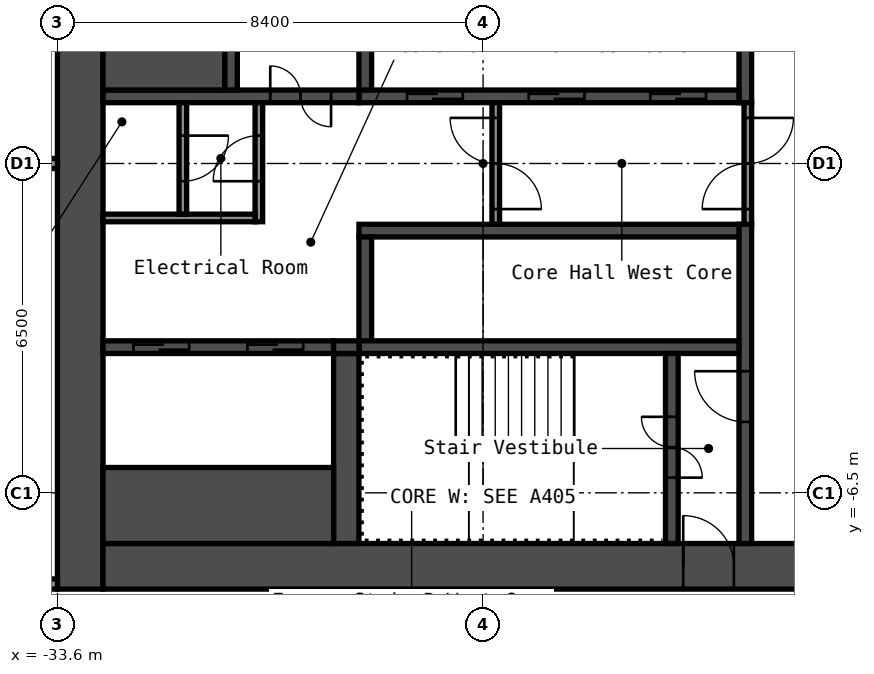
"""IFC4 building model, lengths in metres.
Left out: names, types, materials, properties, quantities, classifications, styles, units other than length and angle.
Written with IfcOpenShell. Run it as: python <this file> out.ifc"""

import sys

from ifc_helpers import new_model, si_unit, direction, frame, frame_2d, origin, place, context, subcontext, project, spatial, rectangle, extrude, element, fill, save


model = new_model("IFC4")
c1 = context("Model", 3, precision=1e-05, world=origin(), true_north=direction((0.0, 1.0)))
c2 = subcontext(c1, "Body", "Model", "MODEL_VIEW")
j1 = project(units=[si_unit("LENGTHUNIT", "METRE"), si_unit("PLANEANGLEUNIT", "RADIAN")], contexts=[c1])
p1 = place(None, origin())
s1 = spatial("IfcSite", under=j1, at=p1, CompositionType="ELEMENT")
p2 = place(p1, origin())
s2 = spatial("IfcBuilding", under=s1, at=p2, CompositionType="ELEMENT")
p3 = place(p2, frame((0.0, 0.0, 35.8)))
s3 = spatial("IfcBuildingStorey", under=s2, at=p3, CompositionType="ELEMENT", Elevation=35.8)
p4 = place(p3, frame((-33.15, -8.4, 0.0), z_axis=(0.0, 0.0, 1.0), x_axis=(0.0, 1.0, 0.0)))
e1 = element("IfcWall", 1, at=p4, inside=s3, PredefinedType="SHEAR", context=c2, shape_type="SweptSolid", body=[
    extrude(rectangle(XDim=16.8, YDim=0.9, at=frame_2d((8.4, 0.0))), origin(), (0.0, 0.0, 1.0), 2.8),
])
p5 = place(p3, frame((-32.7, -7.95, 0.0), z_axis=(0.0, 0.0, 1.0), x_axis=(1.0, 0.0, 0.0)))
e2 = element("IfcWall", 2, at=p5, inside=s3, PredefinedType="SHEAR", context=c2, shape_type="SweptSolid", body=[
    extrude(rectangle(XDim=15.0, YDim=0.9, at=frame_2d((7.5, 0.0))), origin(), (0.0, 0.0, 1.0), 2.8),
])
p6 = place(p5, frame((11.45, 0.0, 0.0)))
e3 = element("IfcOpeningElement", 3, at=p6, cuts=e2, PredefinedType="OPENING", context=c2, shape_type="SweptSolid", body=[
    extrude(rectangle(XDim=1.0, YDim=2.1, at=frame_2d((0.5, 1.05))), frame((0.0, 0.46, 0.0), z_axis=(0.0, -1.0, 0.0), x_axis=(1.0, 0.0, 0.0)), (0.0, 0.0, 1.0), 0.92),
])
p7 = place(p3, frame((-20.025, 1.2, 0.0), z_axis=(0.0, 0.0, 1.0), x_axis=(0.0, 1.0, 0.0)))
e4 = element("IfcWall", 4, at=p7, inside=s3, PredefinedType="SHEAR", context=c2, shape_type="SweptSolid", body=[
    extrude(rectangle(XDim=6.3, YDim=0.25, at=frame_2d((3.15, 0.0))), origin(), (0.0, 0.0, 1.0), 2.8),
])
p8 = place(p3, frame((-20.025, -7.5, 0.0), z_axis=(0.0, 0.0, 1.0), x_axis=(0.0, 1.0, 0.0)))
e5 = element("IfcWall", 5, at=p8, inside=s3, PredefinedType="SHEAR", context=c2, shape_type="SweptSolid", body=[
    extrude(rectangle(XDim=6.3, YDim=0.25, at=frame_2d((3.15, 0.0))), origin(), (0.0, 0.0, 1.0), 2.8),
])
p9 = place(p8, frame((2.4, 0.0, 0.0)))
e6 = element("IfcOpeningElement", 6, at=p9, cuts=e5, PredefinedType="OPENING", context=c2, shape_type="SweptSolid", body=[
    extrude(rectangle(XDim=1.0, YDim=2.1, at=frame_2d((0.5, 1.05))), frame((0.0, 0.135, 0.0), z_axis=(0.0, -1.0, 0.0), x_axis=(1.0, 0.0, 0.0)), (0.0, 0.0, 1.0), 0.27),
])
p10 = place(p3, frame((-27.65, 1.325, 0.0), z_axis=(0.0, 0.0, 1.0), x_axis=(1.0, 0.0, 0.0)))
e7 = element("IfcWall", 7, at=p10, inside=s3, PredefinedType="SHEAR", context=c2, shape_type="SweptSolid", body=[
    extrude(rectangle(XDim=7.5, YDim=0.25, at=frame_2d((3.75, 0.0))), origin(), (0.0, 0.0, 1.0), 2.8),
])
p11 = place(p10, frame((5.75, 0.0, 0.0)))
e8 = element("IfcOpeningElement", 8, at=p11, cuts=e7, PredefinedType="OPENING", context=c2, shape_type="SweptSolid", body=[
    extrude(rectangle(XDim=1.1, YDim=2.1, at=frame_2d((0.55, 1.05))), frame((0.0, 0.135, 0.0), z_axis=(0.0, -1.0, 0.0), x_axis=(1.0, 0.0, 0.0)), (0.0, 0.0, 1.0), 0.27),
])
p12 = place(p10, frame((3.35, 0.0, 0.0)))
e9 = element("IfcOpeningElement", 9, at=p12, cuts=e7, PredefinedType="OPENING", context=c2, shape_type="SweptSolid", body=[
    extrude(rectangle(XDim=1.1, YDim=2.1, at=frame_2d((0.55, 1.05))), frame((0.0, 0.135, 0.0), z_axis=(0.0, -1.0, 0.0), x_axis=(1.0, 0.0, 0.0)), (0.0, 0.0, 1.0), 0.27),
])
p13 = place(p10, frame((0.95, 0.0, 0.0)))
e10 = element("IfcOpeningElement", 10, at=p13, cuts=e7, PredefinedType="OPENING", context=c2, shape_type="SweptSolid", body=[
    extrude(rectangle(XDim=1.1, YDim=2.1, at=frame_2d((0.55, 1.05))), frame((0.0, 0.135, 0.0), z_axis=(0.0, -1.0, 0.0), x_axis=(1.0, 0.0, 0.0)), (0.0, 0.0, 1.0), 0.27),
])
p14 = place(p3, frame((-27.525, 1.45, 0.0), z_axis=(0.0, 0.0, 1.0), x_axis=(0.0, 1.0, 0.0)))
e11 = element("IfcWall", 11, at=p14, inside=s3, PredefinedType="SHEAR", context=c2, shape_type="SweptSolid", body=[
    extrude(rectangle(XDim=2.05, YDim=0.25, at=frame_2d((1.025, 0.0))), origin(), (0.0, 0.0, 1.0), 2.8),
])
p15 = place(p3, frame((-32.7, 1.325, 0.0), z_axis=(0.0, 0.0, 1.0), x_axis=(1.0, 0.0, 0.0)))
e12 = element("IfcWall", 12, at=p15, inside=s3, PredefinedType="SHEAR", context=c2, shape_type="SweptSolid", body=[
    extrude(rectangle(XDim=5.05, YDim=0.25, at=frame_2d((2.525, 0.0))), origin(), (0.0, 0.0, 1.0), 2.8),
])
p16 = place(p15, frame((3.3, 0.0, 0.0)))
e13 = element("IfcOpeningElement", 13, at=p16, cuts=e12, PredefinedType="OPENING", context=c2, shape_type="SweptSolid", body=[
    extrude(rectangle(XDim=1.2, YDim=2.1, at=frame_2d((0.6, 1.05))), frame((0.0, 0.135, 0.0), z_axis=(0.0, -1.0, 0.0), x_axis=(1.0, 0.0, 0.0)), (0.0, 0.0, 1.0), 0.27),
])
p17 = place(p3, frame((-30.175, 1.45, 0.0), z_axis=(0.0, 0.0, 1.0), x_axis=(0.0, 1.0, 0.0)))
e14 = element("IfcWall", 14, at=p17, inside=s3, PredefinedType="SHEAR", context=c2, shape_type="SweptSolid", body=[
    extrude(rectangle(XDim=6.05, YDim=0.25, at=frame_2d((3.025, 0.0))), origin(), (0.0, 0.0, 1.0), 2.8),
])
p18 = place(p17, frame((2.625, 0.0, 0.0)))
e15 = element("IfcOpeningElement", 15, at=p18, cuts=e14, PredefinedType="OPENING", context=c2, shape_type="SweptSolid", body=[
    extrude(rectangle(XDim=1.1, YDim=2.1, at=frame_2d((0.55, 1.05))), frame((0.0, 0.135, 0.0), z_axis=(0.0, -1.0, 0.0), x_axis=(1.0, 0.0, 0.0)), (0.0, 0.0, 1.0), 0.27),
])
p19 = place(p3, frame((-32.7, 2.375, 0.0), z_axis=(0.0, 0.0, 1.0), x_axis=(1.0, 0.0, 0.0)))
e16 = element("IfcWall", 16, at=p19, inside=s3, PredefinedType="SHEAR", context=c2, shape_type="SweptSolid", body=[
    extrude(rectangle(XDim=2.4, YDim=1.85, at=frame_2d((1.2, 0.0))), origin(), (0.0, 0.0, 1.0), 2.8),
])
p20 = place(p3, frame((-27.65, -1.325, 0.0), z_axis=(0.0, 0.0, 1.0), x_axis=(1.0, 0.0, 0.0)))
e17 = element("IfcWall", 17, at=p20, inside=s3, PredefinedType="SHEAR", context=c2, shape_type="SweptSolid", body=[
    extrude(rectangle(XDim=7.5, YDim=0.25, at=frame_2d((3.75, 0.0))), origin(), (0.0, 0.0, 1.0), 2.8),
])
p21 = place(p3, frame((-27.525, -3.5, 0.0), z_axis=(0.0, 0.0, 1.0), x_axis=(0.0, 1.0, 0.0)))
e18 = element("IfcWall", 18, at=p21, inside=s3, PredefinedType="SHEAR", context=c2, shape_type="SweptSolid", body=[
    extrude(rectangle(XDim=2.05, YDim=0.25, at=frame_2d((1.025, 0.0))), origin(), (0.0, 0.0, 1.0), 2.8),
])
p22 = place(p3, frame((-27.65, -3.625, 0.0), z_axis=(0.0, 0.0, 1.0), x_axis=(1.0, 0.0, 0.0)))
e19 = element("IfcWall", 19, at=p22, inside=s3, PredefinedType="SHEAR", context=c2, shape_type="SweptSolid", body=[
    extrude(rectangle(XDim=7.5, YDim=0.25, at=frame_2d((3.75, 0.0))), origin(), (0.0, 0.0, 1.0), 2.8),
])
p23 = place(p3, frame((-21.475, -7.5, 0.0), z_axis=(0.0, 0.0, 1.0), x_axis=(0.0, 1.0, 0.0)))
e20 = element("IfcWall", 20, at=p23, inside=s3, PredefinedType="SHEAR", context=c2, shape_type="SweptSolid", body=[
    extrude(rectangle(XDim=3.75, YDim=0.25, at=frame_2d((1.875, 0.0))), origin(), (0.0, 0.0, 1.0), 2.8),
])
p24 = place(p23, frame((1.3, 0.0, 0.0)))
e21 = element("IfcOpeningElement", 21, at=p24, cuts=e20, PredefinedType="OPENING", context=c2, shape_type="SweptSolid", body=[
    extrude(rectangle(XDim=1.2, YDim=2.1, at=frame_2d((0.6, 1.05))), frame((0.0, 0.135, 0.0), z_axis=(0.0, -1.0, 0.0), x_axis=(1.0, 0.0, 0.0)), (0.0, 0.0, 1.0), 0.27),
])
p25 = place(p3, frame((-27.9, -7.5, 0.0), z_axis=(0.0, 0.0, 1.0), x_axis=(0.0, 1.0, 0.0)))
e22 = element("IfcWall", 22, at=p25, inside=s3, PredefinedType="SHEAR", context=c2, shape_type="SweptSolid", body=[
    extrude(rectangle(XDim=3.75, YDim=0.5, at=frame_2d((1.875, 0.0))), origin(), (0.0, 0.0, 1.0), 2.8),
])
p26 = place(p3, frame((-32.7, -3.625, 0.0), z_axis=(0.0, 0.0, 1.0), x_axis=(1.0, 0.0, 0.0)))
e23 = element("IfcWall", 23, at=p26, inside=s3, PredefinedType="SHEAR", context=c2, shape_type="SweptSolid", body=[
    extrude(rectangle(XDim=4.55, YDim=0.25, at=frame_2d((2.275, 0.0))), origin(), (0.0, 0.0, 1.0), 2.8),
])
p27 = place(p26, frame((2.85, 0.0, 0.0)))
e24 = element("IfcOpeningElement", 24, at=p27, cuts=e23, PredefinedType="OPENING", context=c2, shape_type="SweptSolid", body=[
    extrude(rectangle(XDim=1.1, YDim=2.1, at=frame_2d((0.55, 1.05))), frame((0.0, 0.135, 0.0), z_axis=(0.0, -1.0, 0.0), x_axis=(1.0, 0.0, 0.0)), (0.0, 0.0, 1.0), 0.27),
])
p28 = place(p26, frame((0.6, 0.0, 0.0)))
e25 = element("IfcOpeningElement", 25, at=p28, cuts=e23, PredefinedType="OPENING", context=c2, shape_type="SweptSolid", body=[
    extrude(rectangle(XDim=1.1, YDim=2.1, at=frame_2d((0.55, 1.05))), frame((0.0, 0.135, 0.0), z_axis=(0.0, -1.0, 0.0), x_axis=(1.0, 0.0, 0.0)), (0.0, 0.0, 1.0), 0.27),
])
p29 = place(p3, frame((-32.7, -6.75, 0.0), z_axis=(0.0, 0.0, 1.0), x_axis=(1.0, 0.0, 0.0)))
e26 = element("IfcWall", 26, at=p29, inside=s3, PredefinedType="SHEAR", context=c2, shape_type="SweptSolid", body=[
    extrude(rectangle(XDim=4.55, YDim=1.5, at=frame_2d((2.275, 0.0))), origin(), (0.0, 0.0, 1.0), 2.8),
])
p30 = place(p3, frame((-28.15, -3.625, 0.0), z_axis=(0.0, 0.0, 1.0), x_axis=(1.0, 0.0, 0.0)))
e27 = element("IfcWall", 27, at=p30, inside=s3, PredefinedType="SHEAR", context=c2, shape_type="SweptSolid", body=[
    extrude(rectangle(XDim=0.5, YDim=0.25, at=frame_2d((0.25, 0.0))), origin(), (0.0, 0.0, 1.0), 2.8),
])
p31 = place(p3, frame((-19.975, -1.2, 0.0), z_axis=(0.0, 0.0, 1.0), x_axis=(0.0, 1.0, 0.0)))
e28 = element("IfcWall", 28, at=p31, inside=s3, PredefinedType="PARTITIONING", context=c2, shape_type="SweptSolid", body=[
    extrude(rectangle(XDim=2.4, YDim=0.15, at=frame_2d((1.2, 0.0))), origin(), (0.0, 0.0, 1.0), 2.8),
])
p32 = place(p31, frame((0.3, 0.0, 0.0)))
e29 = element("IfcOpeningElement", 29, at=p32, cuts=e28, PredefinedType="OPENING", context=c2, shape_type="SweptSolid", body=[
    extrude(rectangle(XDim=1.8, YDim=2.1, at=frame_2d((0.9, 1.05))), frame((0.0, 0.085, 0.0), z_axis=(0.0, -1.0, 0.0), x_axis=(1.0, 0.0, 0.0)), (0.0, 0.0, 1.0), 0.17),
])
p33 = place(p3, frame((-24.95, -1.2, 0.0), z_axis=(0.0, 0.0, 1.0), x_axis=(0.0, 1.0, 0.0)))
e30 = element("IfcWall", 30, at=p33, inside=s3, PredefinedType="PARTITIONING", context=c2, shape_type="SweptSolid", body=[
    extrude(rectangle(XDim=2.4, YDim=0.15, at=frame_2d((1.2, 0.0))), origin(), (0.0, 0.0, 1.0), 2.8),
])
p34 = place(p33, frame((0.3, 0.0, 0.0)))
e31 = element("IfcOpeningElement", 31, at=p34, cuts=e30, PredefinedType="OPENING", context=c2, shape_type="SweptSolid", body=[
    extrude(rectangle(XDim=1.8, YDim=2.1, at=frame_2d((0.9, 1.05))), frame((0.0, 0.085, 0.0), z_axis=(0.0, -1.0, 0.0), x_axis=(1.0, 0.0, 0.0)), (0.0, 0.0, 1.0), 0.17),
])
p35 = place(p3, frame((-29.625, -1.15, 0.0), z_axis=(0.0, 0.0, 1.0), x_axis=(0.0, 1.0, 0.0)))
e32 = element("IfcWall", 32, at=p35, inside=s3, PredefinedType="PARTITIONING", context=c2, shape_type="SweptSolid", body=[
    extrude(rectangle(XDim=2.35, YDim=0.15, at=frame_2d((1.175, 0.0))), origin(), (0.0, 0.0, 1.0), 2.8),
])
p36 = place(p35, frame((0.8, 0.0, 0.0)))
e33 = element("IfcOpeningElement", 33, at=p36, cuts=e32, PredefinedType="OPENING", context=c2, shape_type="SweptSolid", body=[
    extrude(rectangle(XDim=0.9, YDim=2.1, at=frame_2d((0.45, 1.05))), frame((0.0, 0.085, 0.0), z_axis=(0.0, -1.0, 0.0), x_axis=(1.0, 0.0, 0.0)), (0.0, 0.0, 1.0), 0.17),
])
p37 = place(p3, frame((-32.7, -1.075, 0.0), z_axis=(0.0, 0.0, 1.0), x_axis=(1.0, 0.0, 0.0)))
e34 = element("IfcWall", 34, at=p37, inside=s3, PredefinedType="PARTITIONING", context=c2, shape_type="SweptSolid", body=[
    extrude(rectangle(XDim=3.0, YDim=0.15, at=frame_2d((1.5, 0.0))), origin(), (0.0, 0.0, 1.0), 2.8),
])
p38 = place(p3, frame((-31.125, -1.0, 0.0), z_axis=(0.0, 0.0, 1.0), x_axis=(0.0, 1.0, 0.0)))
e35 = element("IfcWall", 35, at=p38, inside=s3, PredefinedType="PARTITIONING", context=c2, shape_type="SweptSolid", body=[
    extrude(rectangle(XDim=2.2, YDim=0.15, at=frame_2d((1.1, 0.0))), origin(), (0.0, 0.0, 1.0), 2.8),
])
p39 = place(p38, frame((0.65, 0.0, 0.0)))
e36 = element("IfcOpeningElement", 36, at=p39, cuts=e35, PredefinedType="OPENING", context=c2, shape_type="SweptSolid", body=[
    extrude(rectangle(XDim=0.9, YDim=2.1, at=frame_2d((0.45, 1.05))), frame((0.0, 0.085, 0.0), z_axis=(0.0, -1.0, 0.0), x_axis=(1.0, 0.0, 0.0)), (0.0, 0.0, 1.0), 0.17),
])
p40 = place(p3, frame((-48.6, -8.3, 0.0), z_axis=(0.0, 0.0, 1.0), x_axis=(1.0, 0.0, 0.0)))
e37 = element("IfcWall", 37, at=p40, inside=s3, PredefinedType="PARTITIONING", context=c2, shape_type="SweptSolid", body=[
    extrude(rectangle(XDim=15.0, YDim=0.2, at=frame_2d((7.5, 0.0))), origin(), (0.0, 0.0, 1.0), 2.8),
])
p41 = place(p40, frame((1.15, 0.0, 0.0)))
e38 = element("IfcOpeningElement", 38, at=p41, cuts=e37, PredefinedType="OPENING", context=c2, shape_type="SweptSolid", body=[
    extrude(rectangle(XDim=1.0, YDim=2.1, at=frame_2d((0.5, 1.05))), frame((0.0, 0.11, 0.0), z_axis=(0.0, -1.0, 0.0), x_axis=(1.0, 0.0, 0.0)), (0.0, 0.0, 1.0), 0.22),
])
p42 = place(p40, frame((12.0, 0.0, 0.0)))
e39 = element("IfcOpeningElement", 39, at=p42, cuts=e37, PredefinedType="OPENING", context=c2, shape_type="SweptSolid", body=[
    extrude(rectangle(XDim=1.0, YDim=2.1, at=frame_2d((0.5, 1.05))), frame((0.0, 0.11, 0.0), z_axis=(0.0, -1.0, 0.0), x_axis=(1.0, 0.0, 0.0)), (0.0, 0.0, 1.0), 0.22),
])
p43 = place(p3, frame((-48.5, 0.0, 0.0), z_axis=(0.0, 0.0, 1.0), x_axis=(1.0, 0.0, 0.0)))
e40 = element("IfcWall", 40, at=p43, inside=s3, PredefinedType="PARTITIONING", context=c2, shape_type="SweptSolid", body=[
    extrude(rectangle(XDim=14.9, YDim=0.2, at=frame_2d((7.45, 0.0))), origin(), (0.0, 0.0, 1.0), 2.8),
])
p44 = place(p6, origin())
e41 = element("IfcDoor", 41, at=p44, inside=s3, OperationType="SINGLE_SWING_RIGHT", PredefinedType="DOOR", context=c2, shape_type="SweptSolid", body=[
    extrude(rectangle(XDim=1.0, YDim=2.1, at=frame_2d((0.5, 1.05))), frame((0.0, 0.025, 0.0), z_axis=(0.0, -1.0, 0.0), x_axis=(1.0, 0.0, 0.0)), (0.0, 0.0, 1.0), 0.05),
])
fill(e3, e41)
p45 = place(p24, origin())
e42 = element("IfcDoor", 42, at=p45, inside=s3, OperationType="DOUBLE_DOOR_SINGLE_SWING", PredefinedType="DOOR", context=c2, shape_type="SweptSolid", body=[
    extrude(rectangle(XDim=1.2, YDim=2.1, at=frame_2d((0.6, 1.05))), frame((0.0, 0.025, 0.0), z_axis=(0.0, -1.0, 0.0), x_axis=(1.0, 0.0, 0.0)), (0.0, 0.0, 1.0), 0.05),
])
fill(e21, e42)
p46 = place(p9, origin())
e43 = element("IfcDoor", 43, at=p46, inside=s3, OperationType="SINGLE_SWING_LEFT", PredefinedType="DOOR", context=c2, shape_type="SweptSolid", body=[
    extrude(rectangle(XDim=1.0, YDim=2.1, at=frame_2d((0.5, 1.05))), frame((0.0, 0.025, 0.0), z_axis=(0.0, -1.0, 0.0), x_axis=(1.0, 0.0, 0.0)), (0.0, 0.0, 1.0), 0.05),
])
fill(e6, e43)
p47 = place(p16, origin())
e44 = element("IfcDoor", 44, at=p47, inside=s3, OperationType="DOUBLE_DOOR_SINGLE_SWING", PredefinedType="DOOR", context=c2, shape_type="SweptSolid", body=[
    extrude(rectangle(XDim=1.2, YDim=2.1, at=frame_2d((0.6, 1.05))), frame((0.0, 0.025, 0.0), z_axis=(0.0, -1.0, 0.0), x_axis=(1.0, 0.0, 0.0)), (0.0, 0.0, 1.0), 0.05),
])
fill(e13, e44)
p48 = place(p32, origin())
e45 = element("IfcDoor", 45, at=p48, inside=s3, OperationType="DOUBLE_DOOR_SINGLE_SWING", PredefinedType="DOOR", context=c2, shape_type="SweptSolid", body=[
    extrude(rectangle(XDim=1.8, YDim=2.1, at=frame_2d((0.9, 1.05))), frame((0.0, 0.025, 0.0), z_axis=(0.0, -1.0, 0.0), x_axis=(1.0, 0.0, 0.0)), (0.0, 0.0, 1.0), 0.05),
])
fill(e29, e45)
p49 = place(p34, origin())
e46 = element("IfcDoor", 46, at=p49, inside=s3, OperationType="DOUBLE_DOOR_SINGLE_SWING", PredefinedType="DOOR", context=c2, shape_type="SweptSolid", body=[
    extrude(rectangle(XDim=1.8, YDim=2.1, at=frame_2d((0.9, 1.05))), frame((0.0, 0.025, 0.0), z_axis=(0.0, -1.0, 0.0), x_axis=(1.0, 0.0, 0.0)), (0.0, 0.0, 1.0), 0.05),
])
fill(e31, e46)
p50 = place(p36, origin())
e47 = element("IfcDoor", 47, at=p50, inside=s3, OperationType="SINGLE_SWING_RIGHT", PredefinedType="DOOR", context=c2, shape_type="SweptSolid", body=[
    extrude(rectangle(XDim=0.9, YDim=2.1, at=frame_2d((0.45, 1.05))), frame((0.0, 0.025, 0.0), z_axis=(0.0, -1.0, 0.0), x_axis=(1.0, 0.0, 0.0)), (0.0, 0.0, 1.0), 0.05),
])
fill(e33, e47)
p51 = place(p39, origin())
e48 = element("IfcDoor", 48, at=p51, inside=s3, OperationType="SINGLE_SWING_RIGHT", PredefinedType="DOOR", context=c2, shape_type="SweptSolid", body=[
    extrude(rectangle(XDim=0.9, YDim=2.1, at=frame_2d((0.45, 1.05))), frame((0.0, 0.025, 0.0), z_axis=(0.0, -1.0, 0.0), x_axis=(1.0, 0.0, 0.0)), (0.0, 0.0, 1.0), 0.05),
])
fill(e36, e48)
p52 = place(p11, origin())
e49 = element("IfcDoor", 49, at=p52, inside=s3, OperationType="DOUBLE_DOOR_SLIDING", PredefinedType="DOOR", context=c2, shape_type="SweptSolid", body=[
    extrude(rectangle(XDim=1.1, YDim=2.1, at=frame_2d((0.55, 1.05))), frame((0.0, 0.025, 0.0), z_axis=(0.0, -1.0, 0.0), x_axis=(1.0, 0.0, 0.0)), (0.0, 0.0, 1.0), 0.05),
])
fill(e8, e49)
p53 = place(p12, origin())
e50 = element("IfcDoor", 50, at=p53, inside=s3, OperationType="DOUBLE_DOOR_SLIDING", PredefinedType="DOOR", context=c2, shape_type="SweptSolid", body=[
    extrude(rectangle(XDim=1.1, YDim=2.1, at=frame_2d((0.55, 1.05))), frame((0.0, 0.025, 0.0), z_axis=(0.0, -1.0, 0.0), x_axis=(1.0, 0.0, 0.0)), (0.0, 0.0, 1.0), 0.05),
])
fill(e9, e50)
p54 = place(p13, origin())
e51 = element("IfcDoor", 51, at=p54, inside=s3, OperationType="DOUBLE_DOOR_SLIDING", PredefinedType="DOOR", context=c2, shape_type="SweptSolid", body=[
    extrude(rectangle(XDim=1.1, YDim=2.1, at=frame_2d((0.55, 1.05))), frame((0.0, 0.025, 0.0), z_axis=(0.0, -1.0, 0.0), x_axis=(1.0, 0.0, 0.0)), (0.0, 0.0, 1.0), 0.05),
])
fill(e10, e51)
p55 = place(p27, origin())
e52 = element("IfcDoor", 52, at=p55, inside=s3, OperationType="DOUBLE_DOOR_SLIDING", PredefinedType="DOOR", context=c2, shape_type="SweptSolid", body=[
    extrude(rectangle(XDim=1.1, YDim=2.1, at=frame_2d((0.55, 1.05))), frame((0.0, 0.025, 0.0), z_axis=(0.0, -1.0, 0.0), x_axis=(1.0, 0.0, 0.0)), (0.0, 0.0, 1.0), 0.05),
])
fill(e24, e52)
p56 = place(p28, origin())
e53 = element("IfcDoor", 53, at=p56, inside=s3, OperationType="DOUBLE_DOOR_SLIDING", PredefinedType="DOOR", context=c2, shape_type="SweptSolid", body=[
    extrude(rectangle(XDim=1.1, YDim=2.1, at=frame_2d((0.55, 1.05))), frame((0.0, 0.025, 0.0), z_axis=(0.0, -1.0, 0.0), x_axis=(1.0, 0.0, 0.0)), (0.0, 0.0, 1.0), 0.05),
])
fill(e25, e53)
save(model, sys.argv[1])
